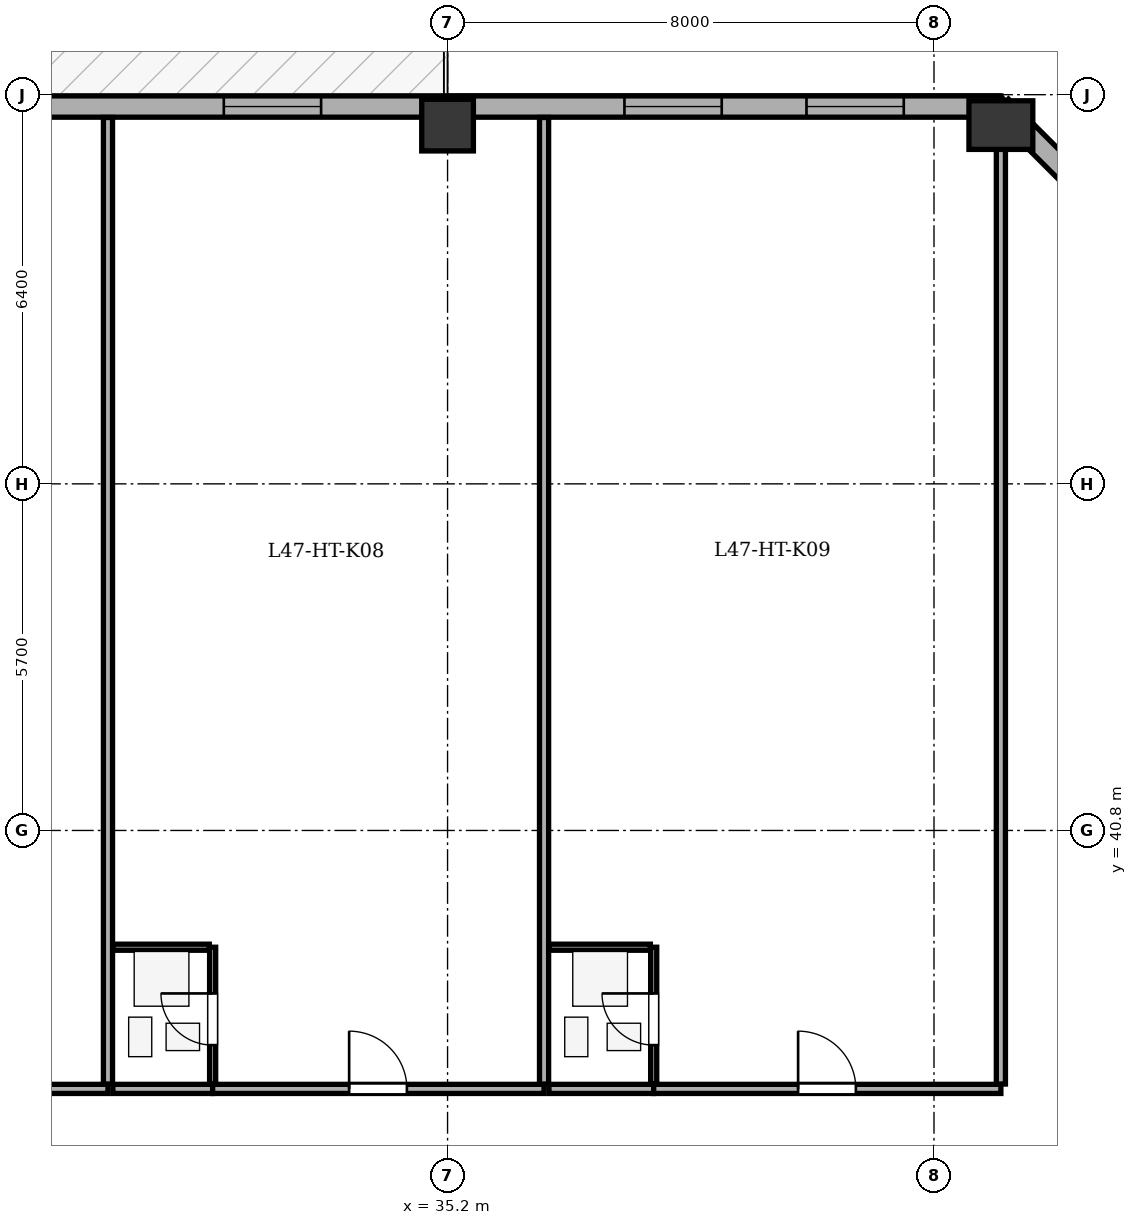
"""IFC4 building model, lengths in metres.
Left out: names, types, materials, properties, quantities, classifications, styles, units other than length and angle.
Written with IfcOpenShell. Run it as: python <this file> out.ifc"""

import sys

from ifc_helpers import new_model, si_unit, direction, frame, frame_2d, origin, origin_2d, place, context, subcontext, project, spatial, rectangle, extrude, element, fill, save


model = new_model("IFC4")
c1 = context("Model", 3, precision=1e-05, world=origin(), true_north=direction((0.0, 1.0)))
c2 = subcontext(c1, "Body", "Model", "MODEL_VIEW")
j1 = project(units=[si_unit("LENGTHUNIT", "METRE"), si_unit("PLANEANGLEUNIT", "RADIAN")], contexts=[c1])
p1 = place(None, origin())
s1 = spatial("IfcSite", under=j1, at=p1, CompositionType="ELEMENT")
p2 = place(p1, origin())
s2 = spatial("IfcBuilding", under=s1, at=p2, CompositionType="ELEMENT")
p3 = place(p2, frame((0.0, 0.0, 183.3)))
s3 = spatial("IfcBuildingStorey", under=s2, at=p3, CompositionType="ELEMENT", Elevation=183.3)
p4 = place(p3, frame((35.2, 52.4, 0.0), z_axis=(0.0, 0.0, 1.0), x_axis=(1.0, 0.0, 0.0)))
e1 = element("IfcColumn", 1, at=p4, inside=s3, PredefinedType="COLUMN", context=c2, shape_type="SweptSolid", body=[
    extrude(rectangle(XDim=0.85, YDim=0.85, at=origin_2d()), origin(), (0.0, 0.0, 1.0), 3.5),
])
p5 = place(p3, frame((44.3, 52.4, 0.0), z_axis=(0.0, 0.0, 1.0), x_axis=(1.0, 0.0, 0.0)))
e2 = element("IfcColumn", 2, at=p5, inside=s3, PredefinedType="COLUMN", context=c2, shape_type="SweptSolid", body=[
    extrude(rectangle(XDim=0.8, YDim=1.05, at=origin_2d()), origin(), (0.0, 0.0, 1.0), 3.5),
])
p6 = place(p3, frame((9.3, 52.705, 0.0), z_axis=(0.0, 0.0, 1.0), x_axis=(1.0, 0.0, 0.0)))
e3 = element("IfcWall", 3, at=p6, inside=s3, PredefinedType="STANDARD", context=c2, shape_type="SweptSolid", body=[
    extrude(rectangle(XDim=35.0, YDim=0.35, at=frame_2d((17.5, 0.0))), origin(), (0.0, 0.0, 1.0), 2.785),
])
p7 = place(p6, frame((14.4, 0.0, 0.0)))
e4 = element("IfcOpeningElement", 4, at=p7, cuts=e3, PredefinedType="OPENING", context=c2, shape_type="SweptSolid", body=[
    extrude(rectangle(XDim=1.0, YDim=2.02, at=frame_2d((0.5, 1.01))), frame((0.0, 0.185, 0.0), z_axis=(0.0, -1.0, 0.0), x_axis=(1.0, 0.0, 0.0)), (0.0, 0.0, 1.0), 0.37),
])
p8 = place(p6, frame((3.123, 0.0, 0.75)))
e5 = element("IfcOpeningElement", 5, at=p8, cuts=e3, PredefinedType="OPENING", context=c2, shape_type="SweptSolid", body=[
    extrude(rectangle(XDim=1.6, YDim=1.75, at=frame_2d((0.8, 0.875))), frame((0.0, 0.185, 0.0), z_axis=(0.0, -1.0, 0.0), x_axis=(1.0, 0.0, 0.0)), (0.0, 0.0, 1.0), 0.37),
])
p9 = place(p6, frame((8.361, 0.0, 0.75)))
e6 = element("IfcOpeningElement", 6, at=p9, cuts=e3, PredefinedType="OPENING", context=c2, shape_type="SweptSolid", body=[
    extrude(rectangle(XDim=1.6, YDim=1.75, at=frame_2d((0.8, 0.875))), frame((0.0, 0.185, 0.0), z_axis=(0.0, -1.0, 0.0), x_axis=(1.0, 0.0, 0.0)), (0.0, 0.0, 1.0), 0.37),
])
p10 = place(p6, frame((22.22, 0.0, 0.75)))
e7 = element("IfcOpeningElement", 7, at=p10, cuts=e3, PredefinedType="OPENING", context=c2, shape_type="SweptSolid", body=[
    extrude(rectangle(XDim=1.6, YDim=1.75, at=frame_2d((0.8, 0.875))), frame((0.0, 0.185, 0.0), z_axis=(0.0, -1.0, 0.0), x_axis=(1.0, 0.0, 0.0)), (0.0, 0.0, 1.0), 0.37),
])
p11 = place(p6, frame((28.809, 0.0, 0.75)))
e8 = element("IfcOpeningElement", 8, at=p11, cuts=e3, PredefinedType="OPENING", context=c2, shape_type="SweptSolid", body=[
    extrude(rectangle(XDim=1.6, YDim=1.75, at=frame_2d((0.8, 0.875))), frame((0.0, 0.185, 0.0), z_axis=(0.0, -1.0, 0.0), x_axis=(1.0, 0.0, 0.0)), (0.0, 0.0, 1.0), 0.37),
])
p12 = place(p6, frame((31.803, 0.0, 0.75)))
e9 = element("IfcOpeningElement", 9, at=p12, cuts=e3, PredefinedType="OPENING", context=c2, shape_type="SweptSolid", body=[
    extrude(rectangle(XDim=1.6, YDim=1.75, at=frame_2d((0.8, 0.875))), frame((0.0, 0.185, 0.0), z_axis=(0.0, -1.0, 0.0), x_axis=(1.0, 0.0, 0.0)), (0.0, 0.0, 1.0), 0.37),
])
p13 = place(p3, frame((44.3, 52.705, 0.0), z_axis=(0.0, 0.0, 1.0), x_axis=(0.707088817216, -0.7071247447, 0.0)))
e10 = element("IfcWall", 10, at=p13, inside=s3, PredefinedType="STANDARD", context=c2, shape_type="SweptSolid", body=[
    extrude(rectangle(XDim=6.795, YDim=0.35, at=frame_2d((3.398, 0.0))), origin(), (0.0, 0.0, 1.0), 2.785),
])
p14 = place(p13, frame((2.698, 0.0, 0.75)))
e11 = element("IfcOpeningElement", 11, at=p14, cuts=e10, PredefinedType="OPENING", context=c2, shape_type="SweptSolid", body=[
    extrude(rectangle(XDim=1.4, YDim=1.65, at=frame_2d((0.7, 0.825))), frame((0.0, 0.185, 0.0), z_axis=(0.0, -1.0, 0.0), x_axis=(1.0, 0.0, 0.0)), (0.0, 0.0, 1.0), 0.37),
])
p15 = place(p3, frame((24.435, 36.55, 0.0), z_axis=(0.0, 0.0, 1.0), x_axis=(1.0, 0.0, 0.0)))
e12 = element("IfcWall", 12, at=p15, inside=s3, PredefinedType="PARTITIONING", context=c2, shape_type="SweptSolid", body=[
    extrude(rectangle(XDim=5.18, YDim=0.15, at=frame_2d((2.59, 0.0))), origin(), (0.0, 0.0, 1.0), 3.2),
])
p16 = place(p15, frame((2.11, 0.0, 0.0)))
e13 = element("IfcOpeningElement", 13, at=p16, cuts=e12, PredefinedType="OPENING", context=c2, shape_type="SweptSolid", body=[
    extrude(rectangle(XDim=0.95, YDim=2.1, at=frame_2d((0.475, 1.05))), frame((0.0, 0.085, 0.0), z_axis=(0.0, -1.0, 0.0), x_axis=(1.0, 0.0, 0.0)), (0.0, 0.0, 1.0), 0.17),
])
p17 = place(p3, frame((29.615, 36.63, 0.0), z_axis=(0.0, 0.0, 1.0), x_axis=(0.0, 1.0, 0.0)))
e14 = element("IfcWall", 14, at=p17, inside=s3, PredefinedType="PARTITIONING", context=c2, shape_type="SweptSolid", body=[
    extrude(rectangle(XDim=15.895, YDim=0.15, at=frame_2d((7.948, 0.0))), origin(), (0.0, 0.0, 1.0), 2.785),
])
p18 = place(p3, frame((29.695, 36.55, 0.0), z_axis=(0.0, 0.0, 1.0), x_axis=(1.0, 0.0, 0.0)))
e15 = element("IfcWall", 15, at=p18, inside=s3, PredefinedType="PARTITIONING", context=c2, shape_type="SweptSolid", body=[
    extrude(rectangle(XDim=1.641, YDim=0.15, at=frame_2d((0.821, 0.0))), origin(), (0.0, 0.0, 1.0), 3.2),
])
p19 = place(p3, frame((31.336, 36.55, 0.0), z_axis=(0.0, 0.0, 1.0), x_axis=(1.0, 0.0, 0.0)))
e16 = element("IfcWall", 16, at=p19, inside=s3, PredefinedType="PARTITIONING", context=c2, shape_type="SweptSolid", body=[
    extrude(rectangle(XDim=5.451, YDim=0.15, at=frame_2d((2.726, 0.0))), origin(), (0.0, 0.0, 1.0), 3.2),
])
p20 = place(p19, frame((2.245, 0.0, 0.0)))
e17 = element("IfcOpeningElement", 17, at=p20, cuts=e16, PredefinedType="OPENING", context=c2, shape_type="SweptSolid", body=[
    extrude(rectangle(XDim=0.95, YDim=2.1, at=frame_2d((0.475, 1.05))), frame((0.0, 0.085, 0.0), z_axis=(0.0, -1.0, 0.0), x_axis=(1.0, 0.0, 0.0)), (0.0, 0.0, 1.0), 0.17),
])
p21 = place(p3, frame((31.336, 36.63, 0.0), z_axis=(0.0, 0.0, 1.0), x_axis=(0.0, 1.0, 0.0)))
e18 = element("IfcWall", 18, at=p21, inside=s3, PredefinedType="PARTITIONING", context=c2, shape_type="SweptSolid", body=[
    extrude(rectangle(XDim=2.25, YDim=0.1, at=frame_2d((1.125, 0.0))), origin(), (0.0, 0.0, 1.0), 3.2),
])
p22 = place(p21, frame((0.64, 0.0, 0.0)))
e19 = element("IfcOpeningElement", 19, at=p22, cuts=e18, PredefinedType="OPENING", context=c2, shape_type="SweptSolid", body=[
    extrude(rectangle(XDim=0.85, YDim=2.05, at=frame_2d((0.425, 1.025))), frame((0.0, 0.06, 0.0), z_axis=(0.0, -1.0, 0.0), x_axis=(1.0, 0.0, 0.0)), (0.0, 0.0, 1.0), 0.12),
])
p23 = place(p3, frame((29.695, 38.88, 0.0), z_axis=(0.0, 0.0, 1.0), x_axis=(1.0, 0.0, 0.0)))
e20 = element("IfcWall", 20, at=p23, inside=s3, PredefinedType="PARTITIONING", context=c2, shape_type="SweptSolid", body=[
    extrude(rectangle(XDim=1.586, YDim=0.1, at=frame_2d((0.793, 0.0))), origin(), (0.0, 0.0, 1.0), 3.2),
])
p24 = place(p3, frame((36.787, 36.63, 0.0), z_axis=(0.0, 0.0, 1.0), x_axis=(0.0, 1.0, 0.0)))
e21 = element("IfcWall", 21, at=p24, inside=s3, PredefinedType="PARTITIONING", context=c2, shape_type="SweptSolid", body=[
    extrude(rectangle(XDim=15.895, YDim=0.15, at=frame_2d((7.948, 0.0))), origin(), (0.0, 0.0, 1.0), 3.2),
])
p25 = place(p3, frame((36.867, 36.55, 0.0), z_axis=(0.0, 0.0, 1.0), x_axis=(1.0, 0.0, 0.0)))
e22 = element("IfcWall", 22, at=p25, inside=s3, PredefinedType="PARTITIONING", context=c2, shape_type="SweptSolid", body=[
    extrude(rectangle(XDim=1.723, YDim=0.15, at=frame_2d((0.862, 0.0))), origin(), (0.0, 0.0, 1.0), 3.2),
])
p26 = place(p3, frame((38.59, 36.55, 0.0), z_axis=(0.0, 0.0, 1.0), x_axis=(1.0, 0.0, 0.0)))
e23 = element("IfcWall", 23, at=p26, inside=s3, PredefinedType="PARTITIONING", context=c2, shape_type="SweptSolid", body=[
    extrude(rectangle(XDim=5.71, YDim=0.15, at=frame_2d((2.855, 0.0))), origin(), (0.0, 0.0, 1.0), 3.2),
])
p27 = place(p26, frame((2.375, 0.0, 0.0)))
e24 = element("IfcOpeningElement", 24, at=p27, cuts=e23, PredefinedType="OPENING", context=c2, shape_type="SweptSolid", body=[
    extrude(rectangle(XDim=0.95, YDim=2.1, at=frame_2d((0.475, 1.05))), frame((0.0, 0.085, 0.0), z_axis=(0.0, -1.0, 0.0), x_axis=(1.0, 0.0, 0.0)), (0.0, 0.0, 1.0), 0.17),
])
p28 = place(p3, frame((38.59, 36.63, 0.0), z_axis=(0.0, 0.0, 1.0), x_axis=(0.0, 1.0, 0.0)))
e25 = element("IfcWall", 25, at=p28, inside=s3, PredefinedType="PARTITIONING", context=c2, shape_type="SweptSolid", body=[
    extrude(rectangle(XDim=2.25, YDim=0.1, at=frame_2d((1.125, 0.0))), origin(), (0.0, 0.0, 1.0), 3.2),
])
p29 = place(p28, frame((0.64, 0.0, 0.0)))
e26 = element("IfcOpeningElement", 26, at=p29, cuts=e25, PredefinedType="OPENING", context=c2, shape_type="SweptSolid", body=[
    extrude(rectangle(XDim=0.85, YDim=2.05, at=frame_2d((0.425, 1.025))), frame((0.0, 0.06, 0.0), z_axis=(0.0, -1.0, 0.0), x_axis=(1.0, 0.0, 0.0)), (0.0, 0.0, 1.0), 0.12),
])
p30 = place(p3, frame((36.867, 38.88, 0.0), z_axis=(0.0, 0.0, 1.0), x_axis=(1.0, 0.0, 0.0)))
e27 = element("IfcWall", 27, at=p30, inside=s3, PredefinedType="PARTITIONING", context=c2, shape_type="SweptSolid", body=[
    extrude(rectangle(XDim=1.668, YDim=0.1, at=frame_2d((0.834, 0.0))), origin(), (0.0, 0.0, 1.0), 3.2),
])
p31 = place(p3, frame((44.3, 36.63, 0.0), z_axis=(0.0, 0.0, 1.0), x_axis=(0.0, 1.0, 0.0)))
e28 = element("IfcWall", 28, at=p31, inside=s3, PredefinedType="PARTITIONING", context=c2, shape_type="SweptSolid", body=[
    extrude(rectangle(XDim=15.895, YDim=0.15, at=frame_2d((7.948, 0.0))), origin(), (0.0, 0.0, 1.0), 3.2),
])
p32 = place(p10, origin())
e29 = element("IfcWindow", 29, at=p32, inside=s3, PartitioningType="SINGLE_PANEL", PredefinedType="WINDOW", context=c2, shape_type="SweptSolid", body=[
    extrude(rectangle(XDim=1.6, YDim=1.75, at=frame_2d((0.8, 0.875))), frame((0.0, -0.01, 0.0), z_axis=(0.0, -1.0, 0.0), x_axis=(1.0, 0.0, 0.0)), (0.0, 0.0, 1.0), 0.06),
])
fill(e7, e29)
p33 = place(p11, origin())
e30 = element("IfcWindow", 30, at=p33, inside=s3, PartitioningType="SINGLE_PANEL", PredefinedType="WINDOW", context=c2, shape_type="SweptSolid", body=[
    extrude(rectangle(XDim=1.6, YDim=1.75, at=frame_2d((0.8, 0.875))), frame((0.0, -0.01, 0.0), z_axis=(0.0, -1.0, 0.0), x_axis=(1.0, 0.0, 0.0)), (0.0, 0.0, 1.0), 0.06),
])
fill(e8, e30)
p34 = place(p12, origin())
e31 = element("IfcWindow", 31, at=p34, inside=s3, PartitioningType="SINGLE_PANEL", PredefinedType="WINDOW", context=c2, shape_type="SweptSolid", body=[
    extrude(rectangle(XDim=1.6, YDim=1.75, at=frame_2d((0.8, 0.875))), frame((0.0, -0.01, 0.0), z_axis=(0.0, -1.0, 0.0), x_axis=(1.0, 0.0, 0.0)), (0.0, 0.0, 1.0), 0.06),
])
fill(e9, e31)
p35 = place(p22, origin())
e32 = element("IfcDoor", 32, at=p35, inside=s3, OperationType="SINGLE_SWING_RIGHT", PredefinedType="DOOR", context=c2, shape_type="SweptSolid", body=[
    extrude(rectangle(XDim=0.85, YDim=2.05, at=frame_2d((0.425, 1.025))), frame((0.0, 0.025, 0.0), z_axis=(0.0, -1.0, 0.0), x_axis=(1.0, 0.0, 0.0)), (0.0, 0.0, 1.0), 0.05),
])
fill(e19, e32)
p36 = place(p20, origin())
e33 = element("IfcDoor", 33, at=p36, inside=s3, OperationType="SINGLE_SWING_LEFT", PredefinedType="DOOR", context=c2, shape_type="SweptSolid", body=[
    extrude(rectangle(XDim=0.95, YDim=2.1, at=frame_2d((0.475, 1.05))), frame((0.0, 0.025, 0.0), z_axis=(0.0, -1.0, 0.0), x_axis=(1.0, 0.0, 0.0)), (0.0, 0.0, 1.0), 0.05),
])
fill(e17, e33)
p37 = place(p29, origin())
e34 = element("IfcDoor", 34, at=p37, inside=s3, OperationType="SINGLE_SWING_RIGHT", PredefinedType="DOOR", context=c2, shape_type="SweptSolid", body=[
    extrude(rectangle(XDim=0.85, YDim=2.05, at=frame_2d((0.425, 1.025))), frame((0.0, 0.025, 0.0), z_axis=(0.0, -1.0, 0.0), x_axis=(1.0, 0.0, 0.0)), (0.0, 0.0, 1.0), 0.05),
])
fill(e26, e34)
p38 = place(p27, origin())
e35 = element("IfcDoor", 35, at=p38, inside=s3, OperationType="SINGLE_SWING_LEFT", PredefinedType="DOOR", context=c2, shape_type="SweptSolid", body=[
    extrude(rectangle(XDim=0.95, YDim=2.1, at=frame_2d((0.475, 1.05))), frame((0.0, 0.025, 0.0), z_axis=(0.0, -1.0, 0.0), x_axis=(1.0, 0.0, 0.0)), (0.0, 0.0, 1.0), 0.05),
])
fill(e24, e35)
save(model, sys.argv[1])
